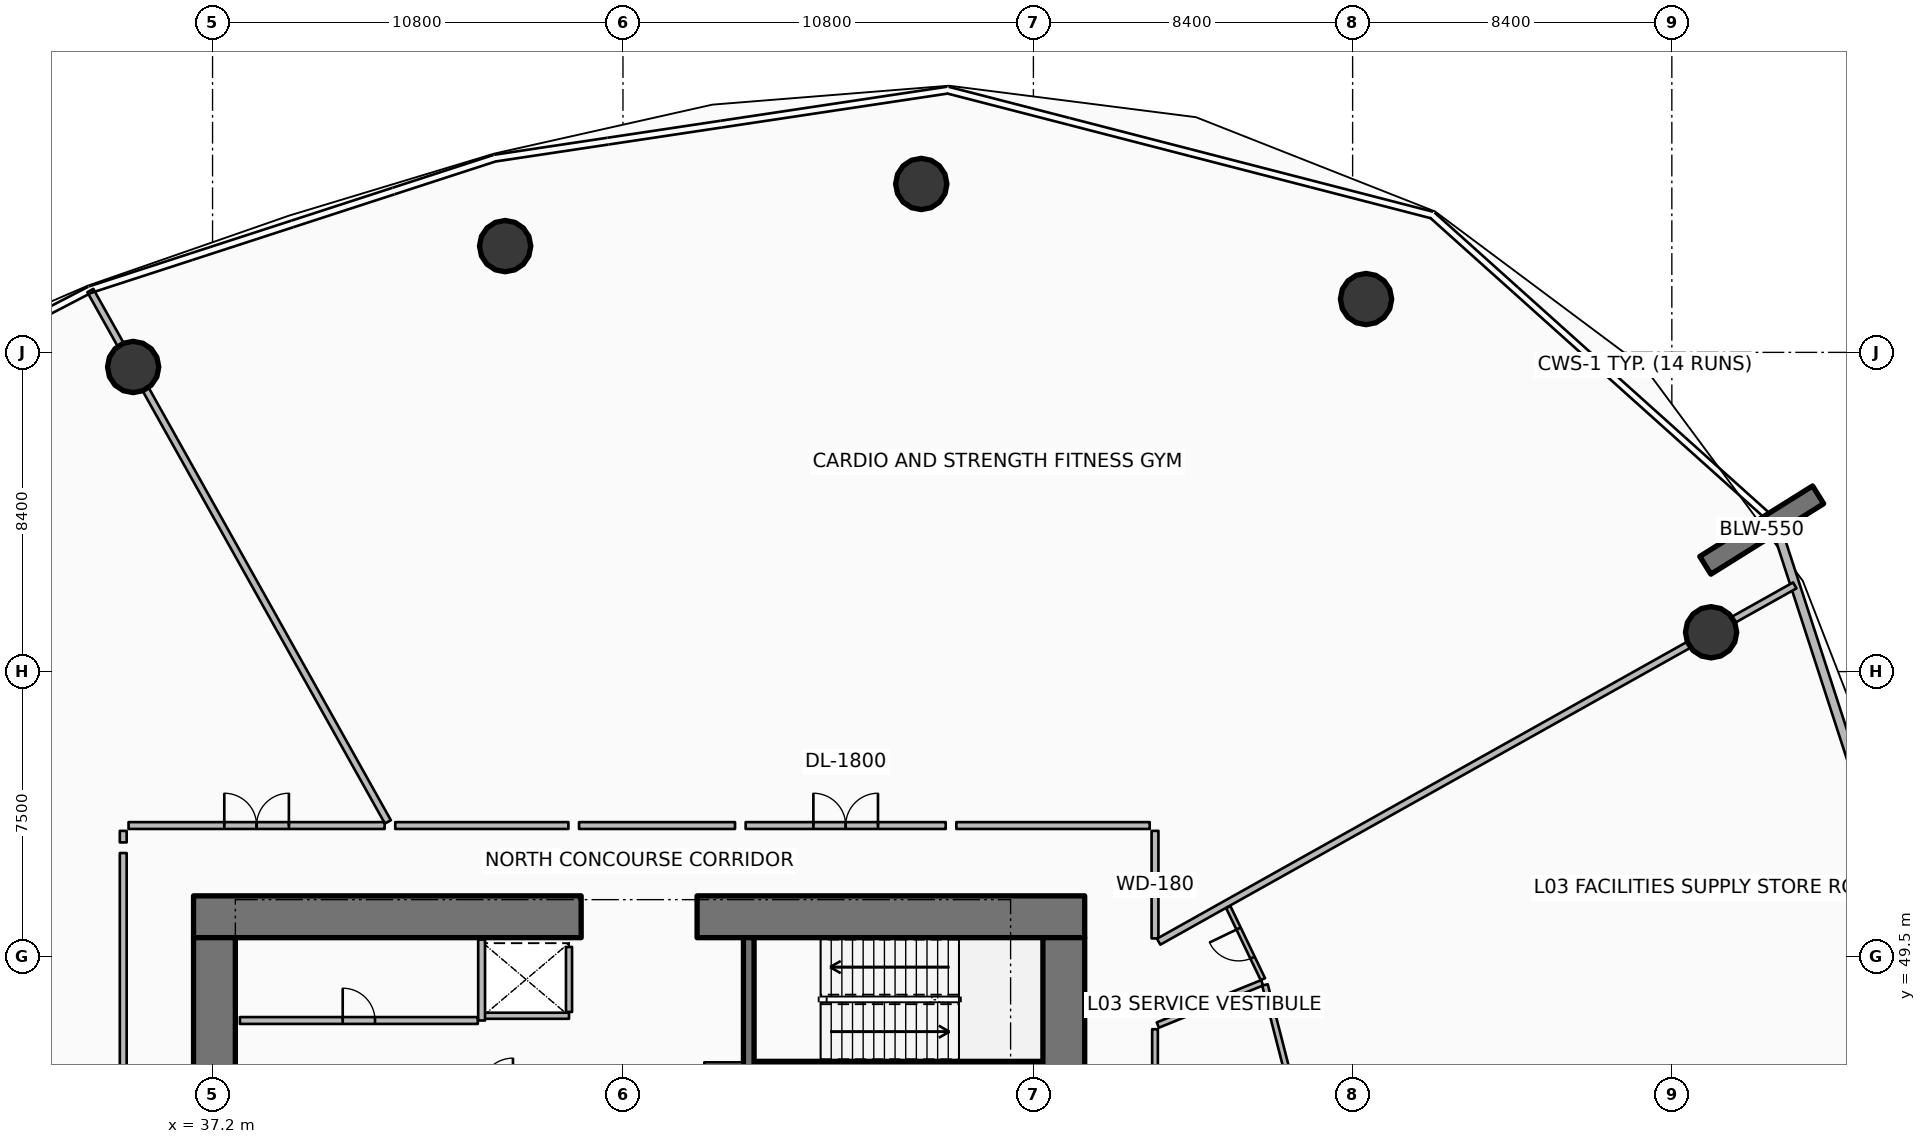
"""IFC4 building model, lengths in metres.
Left out: names, types, materials, properties, quantities, classifications, styles, units other than length and angle.
Written with IfcOpenShell. Run it as: python <this file> out.ifc"""

import sys

from ifc_helpers import new_model, si_unit, direction, frame, frame_2d, origin, origin_2d, place, context, subcontext, project, spatial, rectangle, hollow_rectangle, circle, extrude, element, fill, save


model = new_model("IFC4")
c1 = context("Model", 3, precision=1e-05, world=origin(), true_north=direction((0.0, 1.0)))
c2 = subcontext(c1, "Body", "Model", "MODEL_VIEW")
j1 = project(units=[si_unit("LENGTHUNIT", "METRE"), si_unit("PLANEANGLEUNIT", "RADIAN")], contexts=[c1])
p1 = place(None, origin())
s1 = spatial("IfcSite", under=j1, at=p1, CompositionType="ELEMENT")
p2 = place(p1, origin())
s2 = spatial("IfcBuilding", under=s1, at=p2, CompositionType="ELEMENT")
p3 = place(p2, frame((0.0, 0.0, 16.8)))
s3 = spatial("IfcBuildingStorey", under=s2, at=p3, CompositionType="ELEMENT", Elevation=16.8)
for number, where, z_axis, x_axis in (
    (1, (36.7, 50.55, 0.0), (0.0, 0.0, 1.0), (1.0, 0.0, 0.0)),
    (2, (49.95, 50.55, 0.0), (0.0, 0.0, 1.0), (1.0, 0.0, 0.0)),
):
    element("IfcWall", number, at=place(p3, frame(where, z_axis=z_axis, x_axis=x_axis)), inside=s3, PredefinedType="SHEAR", context=c2, shape_type="SweptSolid", body=[
        extrude(rectangle(XDim=10.2, YDim=1.1, at=frame_2d((5.1, 0.0))), origin(), (0.0, 0.0, 1.0), 4.8),
    ])
for number, where, z_axis, x_axis in (
    (3, (37.25, 34.0, 0.0), (0.0, 0.0, 1.0), (0.0, 1.0, 0.0)),
    (4, (59.6, 34.0, 0.0), (0.0, 0.0, 1.0), (0.0, 1.0, 0.0)),
):
    element("IfcWall", number, at=place(p3, frame(where, z_axis=z_axis, x_axis=x_axis)), inside=s3, PredefinedType="SHEAR", context=c2, shape_type="SweptSolid", body=[
        extrude(rectangle(XDim=16.0, YDim=1.1, at=frame_2d((8.0, 0.0))), origin(), (0.0, 0.0, 1.0), 4.8),
    ])
p4 = place(p3, frame((51.31, 46.5, 0.0), z_axis=(0.0, 0.0, 1.0), x_axis=(0.0, 1.0, 0.0)))
e5 = element("IfcWall", 5, at=p4, inside=s3, PredefinedType="SHEAR", context=c2, shape_type="SweptSolid", body=[
    extrude(rectangle(XDim=3.5, YDim=0.28, at=frame_2d((1.75, 0.0))), origin(), (0.0, 0.0, 1.0), 4.8),
])
p5 = place(p3, frame((56.84, 46.62, 0.0), z_axis=(0.0, 0.0, 1.0), x_axis=(1.0, 0.0, 0.0)))
e6 = element("IfcColumn", 6, at=p5, inside=s3, PredefinedType="COLUMN", context=c2, shape_type="SweptSolid", body=[
    extrude(hollow_rectangle(XDim=0.2, YDim=0.2, WallThickness=0.01, InnerFilletRadius=0.01, OuterFilletRadius=0.02, at=origin_2d()), origin(), (0.0, 0.0, 1.0), 2.195),
])
p6 = place(p3, frame((76.481, 59.797, 0.0), z_axis=(0.0, 0.0, 1.0), x_axis=(0.848053161125, 0.529911158502, 0.0)))
e7 = element("IfcWall", 7, at=p6, inside=s3, PredefinedType="SOLIDWALL", context=c2, shape_type="SweptSolid", body=[
    extrude(rectangle(XDim=3.5, YDim=0.55, at=frame_2d((1.75, 0.0))), origin(), (0.0, 0.0, 1.0), 4.8),
])
for number, where, z_axis, x_axis in (
    (8, (76.633, 58.035, 0.0), (0.0, 0.0, 1.0), (1.0, 0.0, 0.0)),
    (9, (67.553, 66.803, 0.0), (0.0, 0.0, 1.0), (1.0, 0.0, 0.0)),
    (10, (55.849, 69.831, 0.0), (0.0, 0.0, 1.0), (1.0, 0.0, 0.0)),
    (11, (44.899, 68.196, 0.0), (0.0, 0.0, 1.0), (1.0, 0.0, 0.0)),
    (12, (35.111, 65.016, 0.0), (0.0, 0.0, 1.0), (1.0, 0.0, 0.0)),
):
    element("IfcColumn", number, at=place(p3, frame(where, z_axis=z_axis, x_axis=x_axis)), inside=s3, PredefinedType="COLUMN", context=c2, shape_type="SweptSolid", body=[
        extrude(circle(Radius=0.675, at=origin_2d()), origin(), (0.0, 0.0, 1.0), 4.4),
    ])
p7 = place(p3, frame((83.573, 44.725, 0.0), z_axis=(0.0, 0.0, 1.0), x_axis=(-0.309022005354, 0.951054888115, 0.0)))
e13 = element("IfcWall", 13, at=p7, inside=s3, PredefinedType="SOLIDWALL", context=c2, shape_type="SweptSolid", body=[
    extrude(rectangle(XDim=16.803, YDim=0.24, at=frame_2d((8.401, 0.0))), origin(), (0.0, 0.0, 1.0), 3.35),
])
p8 = place(p7, frame((7.201, 0.0, 0.85)))
e14 = element("IfcOpeningElement", 14, at=p8, cuts=e13, PredefinedType="OPENING", context=c2, shape_type="SweptSolid", body=[
    extrude(rectangle(XDim=2.4, YDim=2.1, at=frame_2d((1.2, 1.05))), frame((0.0, 0.13, 0.0), z_axis=(0.0, -1.0, 0.0), x_axis=(1.0, 0.0, 0.0)), (0.0, 0.0, 1.0), 0.26),
])
p9 = place(p3, frame((51.48, 46.62, 0.0), z_axis=(0.0, 0.0, 1.0), x_axis=(1.0, 0.0, 0.0)))
e15 = element("IfcWall", 15, at=p9, inside=s3, PredefinedType="SOLIDWALL", context=c2, shape_type="SweptSolid", body=[
    extrude(rectangle(XDim=7.54, YDim=0.25, at=frame_2d((3.77, 0.0))), origin(), (0.0, 0.0, 1.0), 4.4),
])
p10 = place(p9, frame((0.3, 0.0, 0.0)))
e16 = element("IfcOpeningElement", 16, at=p10, cuts=e15, PredefinedType="OPENING", context=c2, shape_type="SweptSolid", body=[
    extrude(rectangle(XDim=1.55, YDim=2.15, at=frame_2d((0.775, 1.075))), frame((0.0, 0.135, 0.0), z_axis=(0.0, -1.0, 0.0), x_axis=(1.0, 0.0, 0.0)), (0.0, 0.0, 1.0), 0.27),
])
p11 = place(p3, frame((46.58, 47.945, 0.0), z_axis=(0.0, 0.0, 1.0), x_axis=(-1.0, 0.0, 0.0)))
e17 = element("IfcWall", 17, at=p11, inside=s3, PredefinedType="PARTITIONING", context=c2, shape_type="SweptSolid", body=[
    extrude(rectangle(XDim=2.26, YDim=0.16, at=frame_2d((1.13, 0.0))), origin(), (0.0, 0.0, 1.0), 4.4),
])
p12 = place(p3, frame((46.58, 48.045, 0.0), z_axis=(0.0, 0.0, 1.0), x_axis=(0.0, 1.0, 0.0)))
e18 = element("IfcWall", 18, at=p12, inside=s3, PredefinedType="PARTITIONING", context=c2, shape_type="SweptSolid", body=[
    extrude(rectangle(XDim=1.71, YDim=0.16, at=frame_2d((0.855, 0.0))), origin(), (0.0, 0.0, 1.0), 4.4),
])
p13 = place(p3, frame((37.92, 47.82, 0.0), z_axis=(0.0, 0.0, 1.0), x_axis=(1.0, 0.0, 0.0)))
e19 = element("IfcWall", 19, at=p13, inside=s3, PredefinedType="PARTITIONING", context=c2, shape_type="SweptSolid", body=[
    extrude(rectangle(XDim=6.26, YDim=0.18, at=frame_2d((3.13, 0.0))), origin(), (0.0, 0.0, 1.0), 4.4),
])
p14 = place(p13, frame((2.705, 0.0, 0.0)))
e20 = element("IfcOpeningElement", 20, at=p14, cuts=e19, PredefinedType="OPENING", context=c2, shape_type="SweptSolid", body=[
    extrude(rectangle(XDim=0.85, YDim=2.06, at=frame_2d((0.425, 1.03))), frame((0.0, 0.1, 0.0), z_axis=(0.0, -1.0, 0.0), x_axis=(1.0, 0.0, 0.0)), (0.0, 0.0, 1.0), 0.2),
])
p15 = place(p3, frame((44.28, 47.82, 0.0), z_axis=(0.0, 0.0, 1.0), x_axis=(0.0, 1.0, 0.0)))
e21 = element("IfcWall", 21, at=p15, inside=s3, PredefinedType="PARTITIONING", context=c2, shape_type="SweptSolid", body=[
    extrude(rectangle(XDim=2.13, YDim=0.18, at=frame_2d((1.065, 0.0))), origin(), (0.0, 0.0, 1.0), 4.4),
])
p16 = place(p3, frame((50.14, 46.62, 0.0), z_axis=(0.0, 0.0, 1.0), x_axis=(1.0, 0.0, 0.0)))
e22 = element("IfcWall", 22, at=p16, inside=s3, PredefinedType="PARTITIONING", context=c2, shape_type="SweptSolid", body=[
    extrude(rectangle(XDim=1.02, YDim=0.2, at=frame_2d((0.51, 0.0))), origin(), (0.0, 0.0, 1.0), 4.4),
])
p17 = place(p3, frame((62.0, 49.98, 0.0), z_axis=(0.0, 0.0, 1.0), x_axis=(0.0, 1.0, 0.0)))
e23 = element("IfcWall", 23, at=p17, inside=s3, PredefinedType="PARTITIONING", context=c2, shape_type="SweptSolid", body=[
    extrude(rectangle(XDim=2.83, YDim=0.18, at=frame_2d((1.415, 0.0))), origin(), (0.0, 0.0, 1.0), 3.613),
])
p18 = place(p3, frame((61.86, 52.95, 0.0), z_axis=(0.0, 0.0, 1.0), x_axis=(-1.0, 0.0, 0.0)))
e24 = element("IfcWall", 24, at=p18, inside=s3, PredefinedType="PARTITIONING", context=c2, shape_type="SweptSolid", body=[
    extrude(rectangle(XDim=5.088, YDim=0.18, at=frame_2d((2.544, 0.0))), origin(), (0.0, 0.0, 1.0), 3.613),
])
p19 = place(p3, frame((56.492, 52.95, 0.0), z_axis=(0.0, 0.0, 1.0), x_axis=(-1.0, 0.0, 0.0)))
e25 = element("IfcWall", 25, at=p19, inside=s3, PredefinedType="PARTITIONING", context=c2, shape_type="SweptSolid", body=[
    extrude(rectangle(XDim=5.264, YDim=0.18, at=frame_2d((2.632, 0.0))), origin(), (0.0, 0.0, 1.0), 3.613),
])
p20 = place(p19, frame((1.782, 0.0, 0.0)))
e26 = element("IfcOpeningElement", 26, at=p20, cuts=e25, PredefinedType="OPENING", context=c2, shape_type="SweptSolid", body=[
    extrude(rectangle(XDim=1.7, YDim=2.15, at=frame_2d((0.85, 1.075))), frame((0.0, 0.1, 0.0), z_axis=(0.0, -1.0, 0.0), x_axis=(1.0, 0.0, 0.0)), (0.0, 0.0, 1.0), 0.2),
])
p21 = place(p3, frame((50.948, 52.95, 0.0), z_axis=(0.0, 0.0, 1.0), x_axis=(-1.0, 0.0, 0.0)))
e27 = element("IfcWall", 27, at=p21, inside=s3, PredefinedType="PARTITIONING", context=c2, shape_type="SweptSolid", body=[
    extrude(rectangle(XDim=4.104, YDim=0.18, at=frame_2d((2.052, 0.0))), origin(), (0.0, 0.0, 1.0), 3.613),
])
p22 = place(p3, frame((46.564, 52.95, 0.0), z_axis=(0.0, 0.0, 1.0), x_axis=(-1.0, 0.0, 0.0)))
e28 = element("IfcWall", 28, at=p22, inside=s3, PredefinedType="PARTITIONING", context=c2, shape_type="SweptSolid", body=[
    extrude(rectangle(XDim=4.556, YDim=0.18, at=frame_2d((2.278, 0.0))), origin(), (0.0, 0.0, 1.0), 3.613),
])
p23 = place(p3, frame((62.096, 49.894, 0.0), z_axis=(0.0, 0.0, 1.0), x_axis=(0.872490608205, 0.488630881744, 0.0)))
e29 = element("IfcWall", 29, at=p23, inside=s3, PredefinedType="PARTITIONING", context=c2, shape_type="SweptSolid", body=[
    extrude(rectangle(XDim=19.185, YDim=0.18, at=frame_2d((9.592, 0.0))), origin(), (0.0, 0.0, 1.0), 3.613),
])
p24 = place(p3, frame((41.814, 53.046, 0.0), z_axis=(0.0, 0.0, 1.0), x_axis=(-0.48862053439, 0.872496403071, 0.0)))
e30 = element("IfcWall", 30, at=p24, inside=s3, PredefinedType="PARTITIONING", context=c2, shape_type="SweptSolid", body=[
    extrude(rectangle(XDim=16.024, YDim=0.18, at=frame_2d((8.012, 0.0))), origin(), (0.0, 0.0, 1.0), 3.613),
])
p25 = place(p3, frame((41.728, 52.95, 0.0), z_axis=(0.0, 0.0, 1.0), x_axis=(-1.0, 0.0, 0.0)))
e31 = element("IfcWall", 31, at=p25, inside=s3, PredefinedType="PARTITIONING", context=c2, shape_type="SweptSolid", body=[
    extrude(rectangle(XDim=6.738, YDim=0.18, at=frame_2d((3.369, 0.0))), origin(), (0.0, 0.0, 1.0), 3.613),
])
p26 = place(p25, frame((2.519, 0.0, 0.0)))
e32 = element("IfcOpeningElement", 32, at=p26, cuts=e31, PredefinedType="OPENING", context=c2, shape_type="SweptSolid", body=[
    extrude(rectangle(XDim=1.7, YDim=2.15, at=frame_2d((0.85, 1.075))), frame((0.0, 0.1, 0.0), z_axis=(0.0, -1.0, 0.0), x_axis=(1.0, 0.0, 0.0)), (0.0, 0.0, 1.0), 0.2),
])
p27 = place(p3, frame((34.85, 52.81, 0.0), z_axis=(0.0, 0.0, 1.0), x_axis=(0.0, -1.0, 0.0)))
e33 = element("IfcWall", 33, at=p27, inside=s3, PredefinedType="PARTITIONING", context=c2, shape_type="SweptSolid", body=[
    extrude(rectangle(XDim=0.303, YDim=0.18, at=frame_2d((0.152, 0.0))), origin(), (0.0, 0.0, 1.0), 3.613),
])
p28 = place(p3, frame((34.85, 52.227, 0.0), z_axis=(0.0, 0.0, 1.0), x_axis=(0.0, -1.0, 0.0)))
e34 = element("IfcWall", 34, at=p28, inside=s3, PredefinedType="PARTITIONING", context=c2, shape_type="SweptSolid", body=[
    extrude(rectangle(XDim=6.378, YDim=0.18, at=frame_2d((3.189, 0.0))), origin(), (0.0, 0.0, 1.0), 3.613),
])
p29 = place(p3, frame((62.0, 43.757, 0.0), z_axis=(0.0, 0.0, 1.0), x_axis=(0.0, 1.0, 0.0)))
e35 = element("IfcWall", 35, at=p29, inside=s3, PredefinedType="PARTITIONING", context=c2, shape_type="SweptSolid", body=[
    extrude(rectangle(XDim=3.833, YDim=0.15, at=frame_2d((1.917, 0.0))), origin(), (0.0, 0.0, 1.0), 3.613),
])
p30 = place(p29, frame((1.492, 0.0, 0.0)))
e36 = element("IfcOpeningElement", 36, at=p30, cuts=e35, PredefinedType="OPENING", context=c2, shape_type="SweptSolid", body=[
    extrude(rectangle(XDim=0.85, YDim=2.06, at=frame_2d((0.425, 1.03))), frame((0.0, 0.085, 0.0), z_axis=(0.0, -1.0, 0.0), x_axis=(1.0, 0.0, 0.0)), (0.0, 0.0, 1.0), 0.17),
])
p31 = place(p3, frame((62.074, 47.701, 0.0), z_axis=(0.0, 0.0, 1.0), x_axis=(0.926852538468, 0.375425587747, 0.0)))
e37 = element("IfcWall", 37, at=p31, inside=s3, PredefinedType="PARTITIONING", context=c2, shape_type="SweptSolid", body=[
    extrude(rectangle(XDim=2.96, YDim=0.15, at=frame_2d((1.48, 0.0))), origin(), (0.0, 0.0, 1.0), 3.84),
])
p32 = place(p3, frame((66.054, 44.237, 0.0), z_axis=(0.0, 0.0, 1.0), x_axis=(-0.248710144761, 0.968577959636, 0.0)))
e38 = element("IfcWall", 38, at=p32, inside=s3, PredefinedType="PARTITIONING", context=c2, shape_type="SweptSolid", body=[
    extrude(rectangle(XDim=4.667, YDim=0.15, at=frame_2d((2.333, 0.0))), origin(), (0.0, 0.0, 1.0), 3.613),
])
p33 = place(p3, frame((64.839, 48.906, 0.0), z_axis=(0.0, 0.0, 1.0), x_axis=(-0.432923235959, 0.901430791446, 0.0)))
e39 = element("IfcWall", 39, at=p33, inside=s3, PredefinedType="PARTITIONING", context=c2, shape_type="SweptSolid", body=[
    extrude(rectangle(XDim=2.106, YDim=0.125, at=frame_2d((1.053, 0.0))), origin(), (0.0, 0.0, 1.0), 3.613),
])
p34 = place(p33, frame((0.628, 0.0, 0.0)))
e40 = element("IfcOpeningElement", 40, at=p34, cuts=e39, PredefinedType="OPENING", context=c2, shape_type="SweptSolid", body=[
    extrude(rectangle(XDim=0.85, YDim=2.06, at=frame_2d((0.425, 1.03))), frame((0.0, 0.073, 0.0), z_axis=(0.0, -1.0, 0.0), x_axis=(1.0, 0.0, 0.0)), (0.0, 0.0, 1.0), 0.145),
])
p35 = place(p14, origin())
e41 = element("IfcDoor", 41, at=p35, inside=s3, OperationType="SINGLE_SWING_LEFT", PredefinedType="DOOR", context=c2, shape_type="SweptSolid", body=[
    extrude(rectangle(XDim=0.85, YDim=2.06, at=frame_2d((0.425, 1.03))), frame((0.0, 0.025, 0.0), z_axis=(0.0, -1.0, 0.0), x_axis=(1.0, 0.0, 0.0)), (0.0, 0.0, 1.0), 0.05),
])
fill(e20, e41)
p36 = place(p20, origin())
e42 = element("IfcDoor", 42, at=p36, inside=s3, OperationType="DOUBLE_DOOR_SINGLE_SWING", PredefinedType="DOOR", context=c2, shape_type="SweptSolid", body=[
    extrude(rectangle(XDim=1.7, YDim=2.15, at=frame_2d((0.85, 1.075))), frame((0.0, 0.025, 0.0), z_axis=(0.0, -1.0, 0.0), x_axis=(1.0, 0.0, 0.0)), (0.0, 0.0, 1.0), 0.05),
])
fill(e26, e42)
p37 = place(p26, origin())
e43 = element("IfcDoor", 43, at=p37, inside=s3, OperationType="DOUBLE_DOOR_SINGLE_SWING", PredefinedType="DOOR", context=c2, shape_type="SweptSolid", body=[
    extrude(rectangle(XDim=1.7, YDim=2.15, at=frame_2d((0.85, 1.075))), frame((0.0, 0.025, 0.0), z_axis=(0.0, -1.0, 0.0), x_axis=(1.0, 0.0, 0.0)), (0.0, 0.0, 1.0), 0.05),
])
fill(e32, e43)
p38 = place(p34, origin())
e44 = element("IfcDoor", 44, at=p38, inside=s3, OperationType="SINGLE_SWING_RIGHT", PredefinedType="DOOR", context=c2, shape_type="SweptSolid", body=[
    extrude(rectangle(XDim=0.85, YDim=2.06, at=frame_2d((0.425, 1.03))), frame((0.0, 0.025, 0.0), z_axis=(0.0, -1.0, 0.0), x_axis=(1.0, 0.0, 0.0)), (0.0, 0.0, 1.0), 0.05),
])
fill(e40, e44)
save(model, sys.argv[1])
